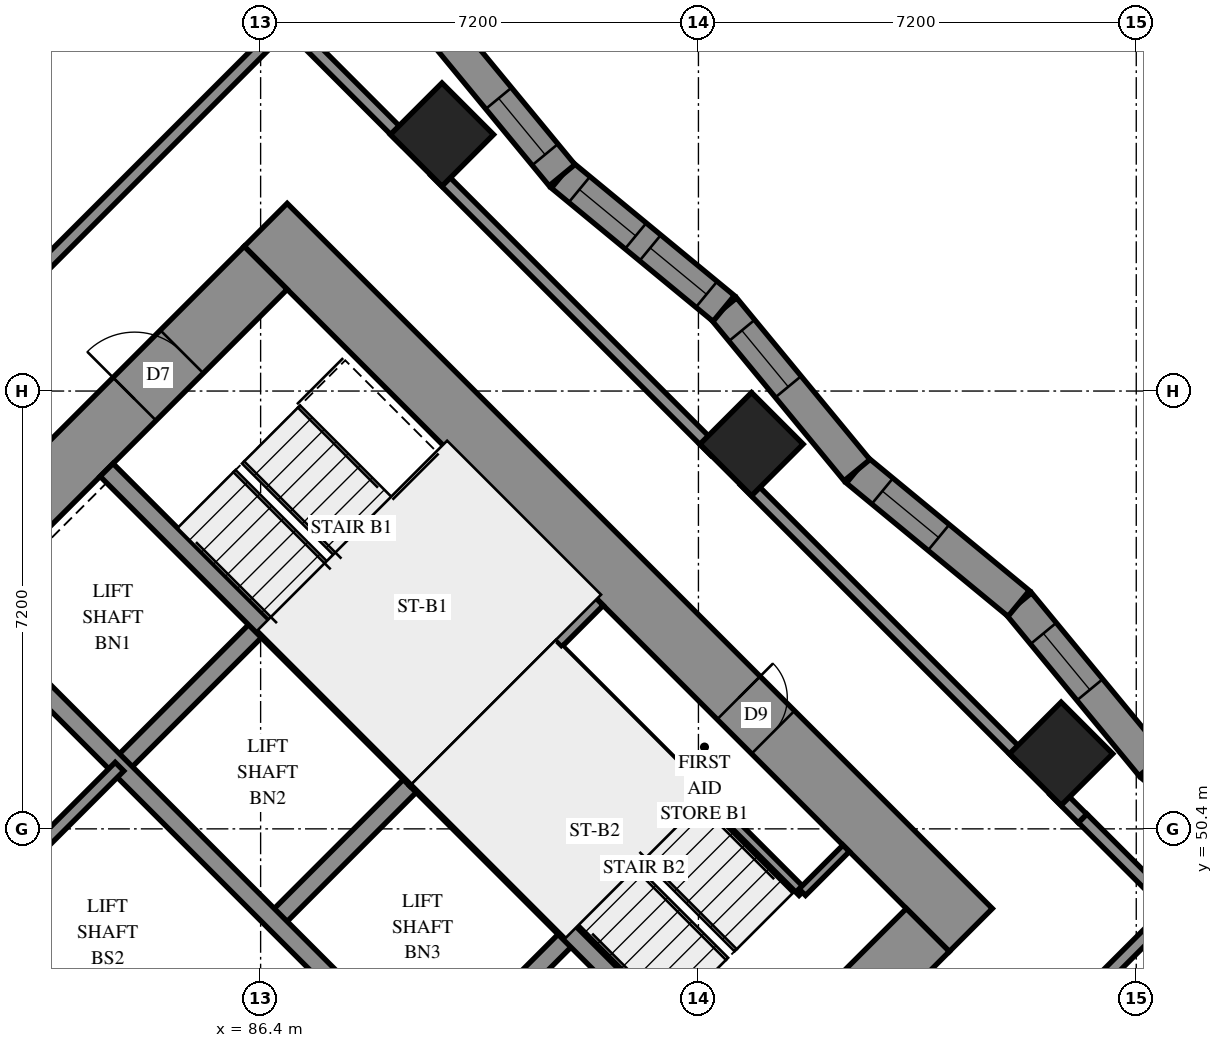
"""IFC4 building model, lengths in metres.
Left out: names, types, materials, properties, quantities, classifications, styles, units other than length and angle.
Written with IfcOpenShell. Run it as: python <this file> out.ifc"""

import sys

from ifc_helpers import new_model, si_unit, direction, frame, frame_2d, origin, origin_2d, place, context, subcontext, project, spatial, polyline, rectangle, outline, extrude, element, fill, save


model = new_model("IFC4")
c1 = context("Model", 3, precision=1e-05, world=origin(), true_north=direction((0.0, 1.0)))
c2 = subcontext(c1, "Body", "Model", "MODEL_VIEW")
j1 = project(units=[si_unit("LENGTHUNIT", "METRE"), si_unit("PLANEANGLEUNIT", "RADIAN")], contexts=[c1])
p1 = place(None, origin())
s1 = spatial("IfcSite", under=j1, at=p1, CompositionType="ELEMENT")
p2 = place(p1, origin())
s2 = spatial("IfcBuilding", under=s1, at=p2, CompositionType="ELEMENT")
p3 = place(p2, frame((0.0, 0.0, 30.4)))
s3 = spatial("IfcBuildingStorey", under=s2, at=p3, CompositionType="ELEMENT", Elevation=30.4)
for number, where, z_axis, x_axis in (
    (1, (89.382, 61.818, 0.0), (0.0, 0.0, 1.0), (0.707, -0.707, 0.0)),
    (2, (94.474, 56.727, 0.0), (0.0, 0.0, 1.0), (0.707, -0.707, 0.0)),
    (3, (99.565, 51.635, 0.0), (0.0, 0.0, 1.0), (0.707, -0.707, 0.0)),
):
    element("IfcColumn", number, at=place(p3, frame(where, z_axis=z_axis, x_axis=x_axis)), inside=s3, PredefinedType="COLUMN", context=c2, shape_type="SweptSolid", body=[
        extrude(rectangle(XDim=1.2, YDim=1.2, at=origin_2d()), origin(), (0.0, 0.0, 1.0), 3.1),
    ])
p4 = place(p3, frame((75.594, 49.443, -0.3), z_axis=(0.0, 0.0, 1.0), x_axis=(0.7071037324, -0.70710983, 0.0)))
e4 = element("IfcWall", 4, at=p4, inside=s3, PredefinedType="SHEAR", context=c2, shape_type="SweptSolid", body=[
    extrude(rectangle(XDim=16.4, YDim=1.0, at=frame_2d((8.2, 0.0))), origin(), (0.0, 0.0, 1.0), 2.7),
])
p5 = place(p3, frame((86.483, 60.333, -0.3), z_axis=(0.0, 0.0, 1.0), x_axis=(0.70710983, -0.7071037324, 0.0)))
e5 = element("IfcWall", 5, at=p5, inside=s3, PredefinedType="SHEAR", context=c2, shape_type="SweptSolid", body=[
    extrude(rectangle(XDim=16.4, YDim=1.0, at=frame_2d((8.2, 0.0))), origin(), (0.0, 0.0, 1.0), 2.7),
])
p6 = place(p5, frame((11.0, 0.0, 0.3)))
e6 = element("IfcOpeningElement", 6, at=p6, cuts=e5, PredefinedType="OPENING", context=c2, shape_type="SweptSolid", body=[
    extrude(rectangle(XDim=0.8, YDim=2.1, at=frame_2d((0.4, 1.05))), frame((0.0, 0.51, 0.0), z_axis=(0.0, -1.0, 0.0), x_axis=(1.0, 0.0, 0.0)), (0.0, 0.0, 1.0), 1.02),
])
p7 = place(p3, frame((76.301, 49.443, -0.3), z_axis=(0.0, 0.0, 1.0), x_axis=(0.7071067812, 0.7071067812, 0.0)))
e7 = element("IfcWall", 7, at=p7, inside=s3, PredefinedType="SHEAR", context=c2, shape_type="SweptSolid", body=[
    extrude(rectangle(XDim=14.4, YDim=1.0, at=frame_2d((7.2, 0.0))), origin(), (0.0, 0.0, 1.0), 2.7),
])
p8 = place(p7, frame((4.55, 0.0, 0.3)))
e8 = element("IfcOpeningElement", 8, at=p8, cuts=e7, PredefinedType="OPENING", context=c2, shape_type="SweptSolid", body=[
    extrude(rectangle(XDim=1.1, YDim=2.1, at=frame_2d((0.55, 1.05))), frame((0.0, 0.51, 0.0), z_axis=(0.0, -1.0, 0.0), x_axis=(1.0, 0.0, 0.0)), (0.0, 0.0, 1.0), 1.02),
])
p9 = place(p7, frame((11.35, 0.0, 0.3)))
e9 = element("IfcOpeningElement", 9, at=p9, cuts=e7, PredefinedType="OPENING", context=c2, shape_type="SweptSolid", body=[
    extrude(rectangle(XDim=1.1, YDim=2.1, at=frame_2d((0.55, 1.05))), frame((0.0, 0.51, 0.0), z_axis=(0.0, -1.0, 0.0), x_axis=(1.0, 0.0, 0.0)), (0.0, 0.0, 1.0), 1.02),
])
p10 = place(p3, frame((87.19, 38.554, -0.3), z_axis=(0.0, 0.0, 1.0), x_axis=(0.707103309, 0.7071102534, 0.0)))
e10 = element("IfcWall", 10, at=p10, inside=s3, PredefinedType="SHEAR", context=c2, shape_type="SweptSolid", body=[
    extrude(rectangle(XDim=14.4, YDim=1.0, at=frame_2d((7.2, 0.0))), origin(), (0.0, 0.0, 1.0), 2.7),
])
p11 = place(p10, frame((4.55, 0.0, 0.3)))
e11 = element("IfcOpeningElement", 11, at=p11, cuts=e10, PredefinedType="OPENING", context=c2, shape_type="SweptSolid", body=[
    extrude(rectangle(XDim=1.1, YDim=2.1, at=frame_2d((0.55, 1.05))), frame((0.0, 0.51, 0.0), z_axis=(0.0, -1.0, 0.0), x_axis=(1.0, 0.0, 0.0)), (0.0, 0.0, 1.0), 1.02),
])
p12 = place(p10, frame((11.35, 0.0, 0.3)))
e12 = element("IfcOpeningElement", 12, at=p12, cuts=e10, PredefinedType="OPENING", context=c2, shape_type="SweptSolid", body=[
    extrude(rectangle(XDim=1.1, YDim=2.1, at=frame_2d((0.55, 1.05))), frame((0.0, 0.51, 0.0), z_axis=(0.0, -1.0, 0.0), x_axis=(1.0, 0.0, 0.0)), (0.0, 0.0, 1.0), 1.02),
])
p13 = place(p3, frame((84.079, 51.423, 0.0), z_axis=(0.0, 0.0, 1.0), x_axis=(0.7071219326, 0.7070916295, 0.0)))
e13 = element("IfcWall", 13, at=p13, inside=s3, PredefinedType="SOLIDWALL", context=c2, shape_type="SweptSolid", body=[
    extrude(rectangle(XDim=3.3, YDim=0.3, at=frame_2d((1.65, 0.0))), origin(), (0.0, 0.0, 1.0), 3.1),
])
for number, where, z_axis, x_axis in (
    (14, (86.625, 48.878, 0.0), (0.0, 0.0, 1.0), (0.707, 0.707, 0.0)),
    (15, (89.17, 46.332, 0.0), (0.0, 0.0, 1.0), (0.707, 0.707, 0.0)),
):
    element("IfcWall", number, at=place(p3, frame(where, z_axis=z_axis, x_axis=x_axis)), inside=s3, PredefinedType="SOLIDWALL", context=c2, shape_type="SweptSolid", body=[
        extrude(rectangle(XDim=3.3, YDim=0.3, at=frame_2d((1.65, 0.0))), origin(), (0.0, 0.0, 1.0), 3.1),
    ])
p14 = place(p3, frame((78.988, 51.423, 0.0), z_axis=(0.0, 0.0, 1.0), x_axis=(0.7071067812, -0.7071067812, 0.0)))
e16 = element("IfcWall", 16, at=p14, inside=s3, PredefinedType="SOLIDWALL", context=c2, shape_type="SweptSolid", body=[
    extrude(rectangle(XDim=14.4, YDim=0.3, at=frame_2d((7.2, 0.0))), origin(), (0.0, 0.0, 1.0), 3.1),
])
p15 = place(p14, frame((1.25, 0.0, 0.0)))
e17 = element("IfcOpeningElement", 17, at=p15, cuts=e16, PredefinedType="OPENING", context=c2, shape_type="SweptSolid", body=[
    extrude(rectangle(XDim=1.1, YDim=2.1, at=frame_2d((0.55, 1.05))), frame((0.0, 0.16, 0.0), z_axis=(0.0, -1.0, 0.0), x_axis=(1.0, 0.0, 0.0)), (0.0, 0.0, 1.0), 0.32),
])
p16 = place(p14, frame((4.85, 0.0, 0.0)))
e18 = element("IfcOpeningElement", 18, at=p16, cuts=e16, PredefinedType="OPENING", context=c2, shape_type="SweptSolid", body=[
    extrude(rectangle(XDim=1.1, YDim=2.1, at=frame_2d((0.55, 1.05))), frame((0.0, 0.16, 0.0), z_axis=(0.0, -1.0, 0.0), x_axis=(1.0, 0.0, 0.0)), (0.0, 0.0, 1.0), 0.32),
])
p17 = place(p14, frame((8.45, 0.0, 0.0)))
e19 = element("IfcOpeningElement", 19, at=p17, cuts=e16, PredefinedType="OPENING", context=c2, shape_type="SweptSolid", body=[
    extrude(rectangle(XDim=1.1, YDim=2.1, at=frame_2d((0.55, 1.05))), frame((0.0, 0.16, 0.0), z_axis=(0.0, -1.0, 0.0), x_axis=(1.0, 0.0, 0.0)), (0.0, 0.0, 1.0), 0.32),
])
p18 = place(p14, frame((12.05, 0.0, 0.0)))
e20 = element("IfcOpeningElement", 20, at=p18, cuts=e16, PredefinedType="OPENING", context=c2, shape_type="SweptSolid", body=[
    extrude(rectangle(XDim=1.1, YDim=2.1, at=frame_2d((0.55, 1.05))), frame((0.0, 0.16, 0.0), z_axis=(0.0, -1.0, 0.0), x_axis=(1.0, 0.0, 0.0)), (0.0, 0.0, 1.0), 0.32),
])
p19 = place(p3, frame((81.534, 53.969, 0.0), z_axis=(0.0, 0.0, 1.0), x_axis=(0.707103309, -0.7071102534, 0.0)))
e21 = element("IfcWall", 21, at=p19, inside=s3, PredefinedType="SOLIDWALL", context=c2, shape_type="SweptSolid", body=[
    extrude(rectangle(XDim=14.4, YDim=0.3, at=frame_2d((7.2, 0.0))), origin(), (0.0, 0.0, 1.0), 3.1),
])
p20 = place(p19, frame((12.05, 0.0, 0.0)))
e22 = element("IfcOpeningElement", 22, at=p20, cuts=e21, PredefinedType="OPENING", context=c2, shape_type="SweptSolid", body=[
    extrude(rectangle(XDim=1.1, YDim=2.1, at=frame_2d((0.55, 1.05))), frame((0.0, 0.16, 0.0), z_axis=(0.0, -1.0, 0.0), x_axis=(1.0, 0.0, 0.0)), (0.0, 0.0, 1.0), 0.32),
])
for number, where, z_axis, x_axis in (
    (23, (83.867, 56.302, 0.0), (0.0, 0.0, 1.0), (0.707, -0.707, 0.0)),
    (24, (88.958, 51.211, 0.0), (0.0, 0.0, 1.0), (0.707, -0.707, 0.0)),
):
    element("IfcWall", number, at=place(p3, frame(where, z_axis=z_axis, x_axis=x_axis)), inside=s3, PredefinedType="SOLIDWALL", context=c2, shape_type="SweptSolid", body=[
        extrude(rectangle(XDim=7.2, YDim=0.3, at=frame_2d((3.6, 0.0))), origin(), (0.0, 0.0, 1.0), 3.1),
    ])
p21 = place(p3, frame((88.958, 51.211, 0.0), z_axis=(0.0, 0.0, 1.0), x_axis=(0.7071067812, 0.7071067812, 0.0)))
e25 = element("IfcWall", 25, at=p21, inside=s3, PredefinedType="SOLIDWALL", context=c2, shape_type="SweptSolid", body=[
    extrude(rectangle(XDim=4.2, YDim=0.3, at=frame_2d((2.1, 0.0))), origin(), (0.0, 0.0, 1.0), 3.1),
])
p22 = place(p3, frame((103.717, 49.256, 0.0), z_axis=(0.0, 0.0, 1.0), x_axis=(-0.7715598569, 0.6361567317, 0.0)))
e26 = element("IfcWall", 26, at=p22, inside=s3, PredefinedType="SOLIDWALL", context=c2, shape_type="SweptSolid", body=[
    extrude(outline(polyline([(-0.026, -0.275), (3.42, -0.275), (3.472, 0.275), (0.026, 0.275), (-0.026, -0.275)])), origin(), (0.0, 0.0, 1.0), 3.1),
])
p23 = place(p22, frame((1.535, 0.0, 0.5)))
e27 = element("IfcOpeningElement", 27, at=p23, cuts=e26, PredefinedType="OPENING", context=c2, shape_type="SweptSolid", body=[
    extrude(rectangle(XDim=1.2, YDim=2.45, at=frame_2d((0.6, 1.225))), frame((0.0, 0.285, 0.0), z_axis=(0.0, -1.0, 0.0), x_axis=(1.0, 0.0, 0.0)), (0.0, 0.0, 1.0), 0.57),
])
p24 = place(p3, frame((101.059, 51.448, 0.0), z_axis=(0.0, 0.0, 1.0), x_axis=(-0.636139456, 0.7715741005, 0.0)))
e28 = element("IfcWall", 28, at=p24, inside=s3, PredefinedType="SOLIDWALL", context=c2, shape_type="SweptSolid", body=[
    extrude(outline(polyline([(0.026, -0.275), (3.472, -0.275), (3.42, 0.275), (-0.026, 0.275), (0.026, -0.275)])), origin(), (0.0, 0.0, 1.0), 3.1),
])
p25 = place(p24, frame((1.607, 0.0, 0.5)))
e29 = element("IfcOpeningElement", 29, at=p25, cuts=e28, PredefinedType="OPENING", context=c2, shape_type="SweptSolid", body=[
    extrude(rectangle(XDim=1.2, YDim=2.45, at=frame_2d((0.6, 1.225))), frame((0.0, 0.285, 0.0), z_axis=(0.0, -1.0, 0.0), x_axis=(1.0, 0.0, 0.0)), (0.0, 0.0, 1.0), 0.57),
])
p26 = place(p3, frame((98.867, 54.107, 0.0), z_axis=(0.0, 0.0, 1.0), x_axis=(-0.7715741005, 0.636139456, 0.0)))
e30 = element("IfcWall", 30, at=p26, inside=s3, PredefinedType="SOLIDWALL", context=c2, shape_type="SweptSolid", body=[
    extrude(outline(polyline([(-0.026, -0.275), (3.42, -0.275), (3.472, 0.275), (0.026, 0.275), (-0.026, -0.275)])), origin(), (0.0, 0.0, 1.0), 3.1),
])
p27 = place(p26, frame((1.706, 0.0, 0.5)))
e31 = element("IfcOpeningElement", 31, at=p27, cuts=e30, PredefinedType="OPENING", context=c2, shape_type="SweptSolid", body=[
    extrude(rectangle(XDim=1.2, YDim=2.45, at=frame_2d((0.6, 1.225))), frame((0.0, 0.285, 0.0), z_axis=(0.0, -1.0, 0.0), x_axis=(1.0, 0.0, 0.0)), (0.0, 0.0, 1.0), 0.57),
])
p28 = place(p3, frame((96.208, 56.299, 0.0), z_axis=(0.0, 0.0, 1.0), x_axis=(-0.6361567317, 0.7715598569, 0.0)))
e32 = element("IfcWall", 32, at=p28, inside=s3, PredefinedType="SOLIDWALL", context=c2, shape_type="SweptSolid", body=[
    extrude(outline(polyline([(0.026, -0.275), (3.472, -0.275), (3.42, 0.275), (-0.026, 0.275), (0.026, -0.275)])), origin(), (0.0, 0.0, 1.0), 3.1),
])
p29 = place(p28, frame((1.778, 0.0, 0.5)))
e33 = element("IfcOpeningElement", 33, at=p29, cuts=e32, PredefinedType="OPENING", context=c2, shape_type="SweptSolid", body=[
    extrude(rectangle(XDim=1.2, YDim=2.45, at=frame_2d((0.6, 1.225))), frame((0.0, 0.285, 0.0), z_axis=(0.0, -1.0, 0.0), x_axis=(1.0, 0.0, 0.0)), (0.0, 0.0, 1.0), 0.57),
])
p30 = place(p3, frame((94.016, 58.958, 0.0), z_axis=(0.0, 0.0, 1.0), x_axis=(-0.7715598569, 0.6361567317, 0.0)))
e34 = element("IfcWall", 34, at=p30, inside=s3, PredefinedType="SOLIDWALL", context=c2, shape_type="SweptSolid", body=[
    extrude(outline(polyline([(-0.026, -0.275), (3.42, -0.275), (3.472, 0.275), (0.026, 0.275), (-0.026, -0.275)])), origin(), (0.0, 0.0, 1.0), 3.1),
])
p31 = place(p30, frame((0.366, 0.0, 0.5)))
e35 = element("IfcOpeningElement", 35, at=p31, cuts=e34, PredefinedType="OPENING", context=c2, shape_type="SweptSolid", body=[
    extrude(rectangle(XDim=1.2, YDim=2.45, at=frame_2d((0.6, 1.225))), frame((0.0, 0.285, 0.0), z_axis=(0.0, -1.0, 0.0), x_axis=(1.0, 0.0, 0.0)), (0.0, 0.0, 1.0), 0.57),
])
p32 = place(p30, frame((1.876, 0.0, 0.5)))
e36 = element("IfcOpeningElement", 36, at=p32, cuts=e34, PredefinedType="OPENING", context=c2, shape_type="SweptSolid", body=[
    extrude(rectangle(XDim=1.2, YDim=2.45, at=frame_2d((0.6, 1.225))), frame((0.0, 0.285, 0.0), z_axis=(0.0, -1.0, 0.0), x_axis=(1.0, 0.0, 0.0)), (0.0, 0.0, 1.0), 0.57),
])
p33 = place(p3, frame((91.357, 61.15, 0.0), z_axis=(0.0, 0.0, 1.0), x_axis=(-0.636139456, 0.7715741005, 0.0)))
e37 = element("IfcWall", 37, at=p33, inside=s3, PredefinedType="SOLIDWALL", context=c2, shape_type="SweptSolid", body=[
    extrude(outline(polyline([(0.026, -0.275), (3.472, -0.275), (3.42, 0.275), (-0.026, 0.275), (0.026, -0.275)])), origin(), (0.0, 0.0, 1.0), 3.1),
])
p34 = place(p33, frame((0.439, 0.0, 0.5)))
e38 = element("IfcOpeningElement", 38, at=p34, cuts=e37, PredefinedType="OPENING", context=c2, shape_type="SweptSolid", body=[
    extrude(rectangle(XDim=1.2, YDim=2.45, at=frame_2d((0.6, 1.225))), frame((0.0, 0.285, 0.0), z_axis=(0.0, -1.0, 0.0), x_axis=(1.0, 0.0, 0.0)), (0.0, 0.0, 1.0), 0.57),
])
p35 = place(p3, frame((91.313, 53.354, 0.0), z_axis=(0.0, 0.0, 1.0), x_axis=(0.7071067812, -0.7071067812, 0.0)))
e39 = element("IfcWall", 39, at=p35, inside=s3, PredefinedType="PARTITIONING", context=c2, shape_type="SweptSolid", body=[
    extrude(rectangle(XDim=5.65, YDim=0.15, at=frame_2d((2.825, 0.0))), origin(), (0.0, 0.0, 1.0), 3.1),
])
p36 = place(p3, frame((95.308, 49.358, 0.0), z_axis=(0.0, 0.0, 1.0), x_axis=(0.70705776, 0.707155799, 0.0)))
e40 = element("IfcWall", 40, at=p36, inside=s3, PredefinedType="PARTITIONING", context=c2, shape_type="SweptSolid", body=[
    extrude(rectangle(XDim=1.02, YDim=0.15, at=frame_2d((0.51, 0.0))), origin(), (0.0, 0.0, 1.0), 3.1),
])
p37 = place(p3, frame((81.534, 48.878, 0.0), z_axis=(0.0, 0.0, 1.0), x_axis=(0.707092892, 0.7071206701, 0.0)))
e41 = element("IfcWall", 41, at=p37, inside=s3, PredefinedType="PARTITIONING", context=c2, shape_type="SweptSolid", body=[
    extrude(rectangle(XDim=3.6, YDim=0.2, at=frame_2d((1.8, 0.0))), origin(), (0.0, 0.0, 1.0), 3.1),
])
p38 = place(p3, frame((94.901, 42.583, 0.0), z_axis=(0.0, 0.0, 1.0), x_axis=(0.7072154749, 0.7069980708, 0.0)))
e42 = element("IfcWall", 42, at=p38, inside=s3, PredefinedType="PARTITIONING", context=c2, shape_type="SweptSolid", body=[
    extrude(rectangle(XDim=9.2, YDim=0.2, at=frame_2d((4.6, 0.0))), origin(), (0.0, 0.0, 1.0), 3.1),
])
p39 = place(p3, frame((81.052, 57.873, 0.0), z_axis=(0.0, 0.0, 1.0), x_axis=(0.7071067812, 0.7071067812, 0.0)))
e43 = element("IfcWall", 43, at=p39, inside=s3, PredefinedType="PARTITIONING", context=c2, shape_type="SweptSolid", body=[
    extrude(rectangle(XDim=8.18, YDim=0.2, at=frame_2d((4.09, 0.0))), origin(), (0.0, 0.0, 1.0), 3.1),
])
p40 = place(p39, frame((0.823, 0.0, 0.0)))
e44 = element("IfcOpeningElement", 44, at=p40, cuts=e43, PredefinedType="OPENING", context=c2, shape_type="SweptSolid", body=[
    extrude(rectangle(XDim=1.0, YDim=2.1, at=frame_2d((0.5, 1.05))), frame((0.0, 0.11, 0.0), z_axis=(0.0, -1.0, 0.0), x_axis=(1.0, 0.0, 0.0)), (0.0, 0.0, 1.0), 0.22),
])
p41 = place(p3, frame((96.947, 43.929, 0.0), z_axis=(0.0, 0.0, 1.0), x_axis=(0.707112894, 0.7071006683, 0.0)))
e45 = element("IfcWall", 45, at=p41, inside=s3, PredefinedType="PARTITIONING", context=c2, shape_type="SweptSolid", body=[
    extrude(rectangle(XDim=8.18, YDim=0.2, at=frame_2d((4.09, 0.0))), origin(), (0.0, 0.0, 1.0), 3.1),
])
p42 = place(p3, frame((89.271, 61.215, 0.0), z_axis=(0.0, 0.0, 1.0), x_axis=(0.7071067812, -0.7071067812, 0.0)))
e46 = element("IfcWall", 46, at=p42, inside=s3, PredefinedType="PARTITIONING", context=c2, shape_type="SweptSolid", body=[
    extrude(rectangle(XDim=6.505, YDim=0.2, at=frame_2d((3.253, 0.0))), origin(), (0.0, 0.0, 1.0), 3.1),
])
p43 = place(p3, frame((94.363, 56.123, 0.0), z_axis=(0.0, 0.0, 1.0), x_axis=(0.7071067812, -0.7071067812, 0.0)))
e47 = element("IfcWall", 47, at=p43, inside=s3, PredefinedType="PARTITIONING", context=c2, shape_type="SweptSolid", body=[
    extrude(rectangle(XDim=6.503, YDim=0.2, at=frame_2d((3.251, 0.0))), origin(), (0.0, 0.0, 1.0), 3.1),
])
p44 = place(p3, frame((86.841, 63.659, 0.0), z_axis=(0.0, 0.0, 1.0), x_axis=(0.7067795096, -0.7074339014, 0.0)))
e48 = element("IfcWall", 48, at=p44, inside=s3, PredefinedType="PARTITIONING", context=c2, shape_type="SweptSolid", body=[
    extrude(rectangle(XDim=2.751, YDim=0.2, at=frame_2d((1.375, 0.0))), origin(), (0.0, 0.0, 1.0), 3.1),
])
p45 = place(p3, frame((99.918, 50.574, 0.0), z_axis=(0.0, 0.0, 1.0), x_axis=(0.7075827869, -0.7066304548, 0.0)))
e49 = element("IfcWall", 49, at=p45, inside=s3, PredefinedType="PARTITIONING", context=c2, shape_type="SweptSolid", body=[
    extrude(rectangle(XDim=2.1, YDim=0.2, at=frame_2d((1.05, 0.0))), origin(), (0.0, 0.0, 1.0), 3.1),
])
p46 = place(p3, frame((99.453, 51.033, 0.0), z_axis=(0.0, 0.0, 1.0), x_axis=(0.7071067812, -0.7071067812, 0.0)))
e50 = element("IfcWall", 50, at=p46, inside=s3, PredefinedType="PARTITIONING", context=c2, shape_type="SweptSolid", body=[
    extrude(rectangle(XDim=0.653, YDim=0.2, at=frame_2d((0.327, 0.0))), origin(), (0.0, 0.0, 1.0), 3.1),
])
p47 = place(p25, origin())
e51 = element("IfcWindow", 51, at=p47, inside=s3, PartitioningType="SINGLE_PANEL", PredefinedType="WINDOW", context=c2, shape_type="SweptSolid", body=[
    extrude(rectangle(XDim=1.2, YDim=2.45, at=frame_2d((0.6, 1.225))), frame((0.0, 0.155, 0.0), z_axis=(0.0, -1.0, 0.0), x_axis=(1.0, 0.0, 0.0)), (0.0, 0.0, 1.0), 0.06),
])
fill(e29, e51)
p48 = place(p27, origin())
e52 = element("IfcWindow", 52, at=p48, inside=s3, PartitioningType="SINGLE_PANEL", PredefinedType="WINDOW", context=c2, shape_type="SweptSolid", body=[
    extrude(rectangle(XDim=1.2, YDim=2.45, at=frame_2d((0.6, 1.225))), frame((0.0, 0.155, 0.0), z_axis=(0.0, -1.0, 0.0), x_axis=(1.0, 0.0, 0.0)), (0.0, 0.0, 1.0), 0.06),
])
fill(e31, e52)
p49 = place(p29, origin())
e53 = element("IfcWindow", 53, at=p49, inside=s3, PartitioningType="SINGLE_PANEL", PredefinedType="WINDOW", context=c2, shape_type="SweptSolid", body=[
    extrude(rectangle(XDim=1.2, YDim=2.45, at=frame_2d((0.6, 1.225))), frame((0.0, 0.155, 0.0), z_axis=(0.0, -1.0, 0.0), x_axis=(1.0, 0.0, 0.0)), (0.0, 0.0, 1.0), 0.06),
])
fill(e33, e53)
p50 = place(p31, origin())
e54 = element("IfcWindow", 54, at=p50, inside=s3, PartitioningType="SINGLE_PANEL", PredefinedType="WINDOW", context=c2, shape_type="SweptSolid", body=[
    extrude(rectangle(XDim=1.2, YDim=2.45, at=frame_2d((0.6, 1.225))), frame((0.0, 0.155, 0.0), z_axis=(0.0, -1.0, 0.0), x_axis=(1.0, 0.0, 0.0)), (0.0, 0.0, 1.0), 0.06),
])
fill(e35, e54)
p51 = place(p32, origin())
e55 = element("IfcWindow", 55, at=p51, inside=s3, PartitioningType="SINGLE_PANEL", PredefinedType="WINDOW", context=c2, shape_type="SweptSolid", body=[
    extrude(rectangle(XDim=1.2, YDim=2.45, at=frame_2d((0.6, 1.225))), frame((0.0, 0.155, 0.0), z_axis=(0.0, -1.0, 0.0), x_axis=(1.0, 0.0, 0.0)), (0.0, 0.0, 1.0), 0.06),
])
fill(e36, e55)
p52 = place(p34, origin())
e56 = element("IfcWindow", 56, at=p52, inside=s3, PartitioningType="SINGLE_PANEL", PredefinedType="WINDOW", context=c2, shape_type="SweptSolid", body=[
    extrude(rectangle(XDim=1.2, YDim=2.45, at=frame_2d((0.6, 1.225))), frame((0.0, 0.155, 0.0), z_axis=(0.0, -1.0, 0.0), x_axis=(1.0, 0.0, 0.0)), (0.0, 0.0, 1.0), 0.06),
])
fill(e38, e56)
p53 = place(p6, origin())
e57 = element("IfcDoor", 57, at=p53, inside=s3, OperationType="SINGLE_SWING_RIGHT", PredefinedType="DOOR", context=c2, shape_type="SweptSolid", body=[
    extrude(rectangle(XDim=0.8, YDim=2.1, at=frame_2d((0.4, 1.05))), frame((0.0, -0.44, 0.0), z_axis=(0.0, -1.0, 0.0), x_axis=(1.0, 0.0, 0.0)), (0.0, 0.0, 1.0), 0.05),
])
fill(e6, e57)
p54 = place(p9, origin())
e58 = element("IfcDoor", 58, at=p54, inside=s3, OperationType="SINGLE_SWING_LEFT", PredefinedType="DOOR", context=c2, shape_type="SweptSolid", body=[
    extrude(rectangle(XDim=1.1, YDim=2.1, at=frame_2d((0.55, 1.05))), frame((0.0, 0.025, 0.0), z_axis=(0.0, -1.0, 0.0), x_axis=(1.0, 0.0, 0.0)), (0.0, 0.0, 1.0), 0.05),
])
fill(e9, e58)
save(model, sys.argv[1])
